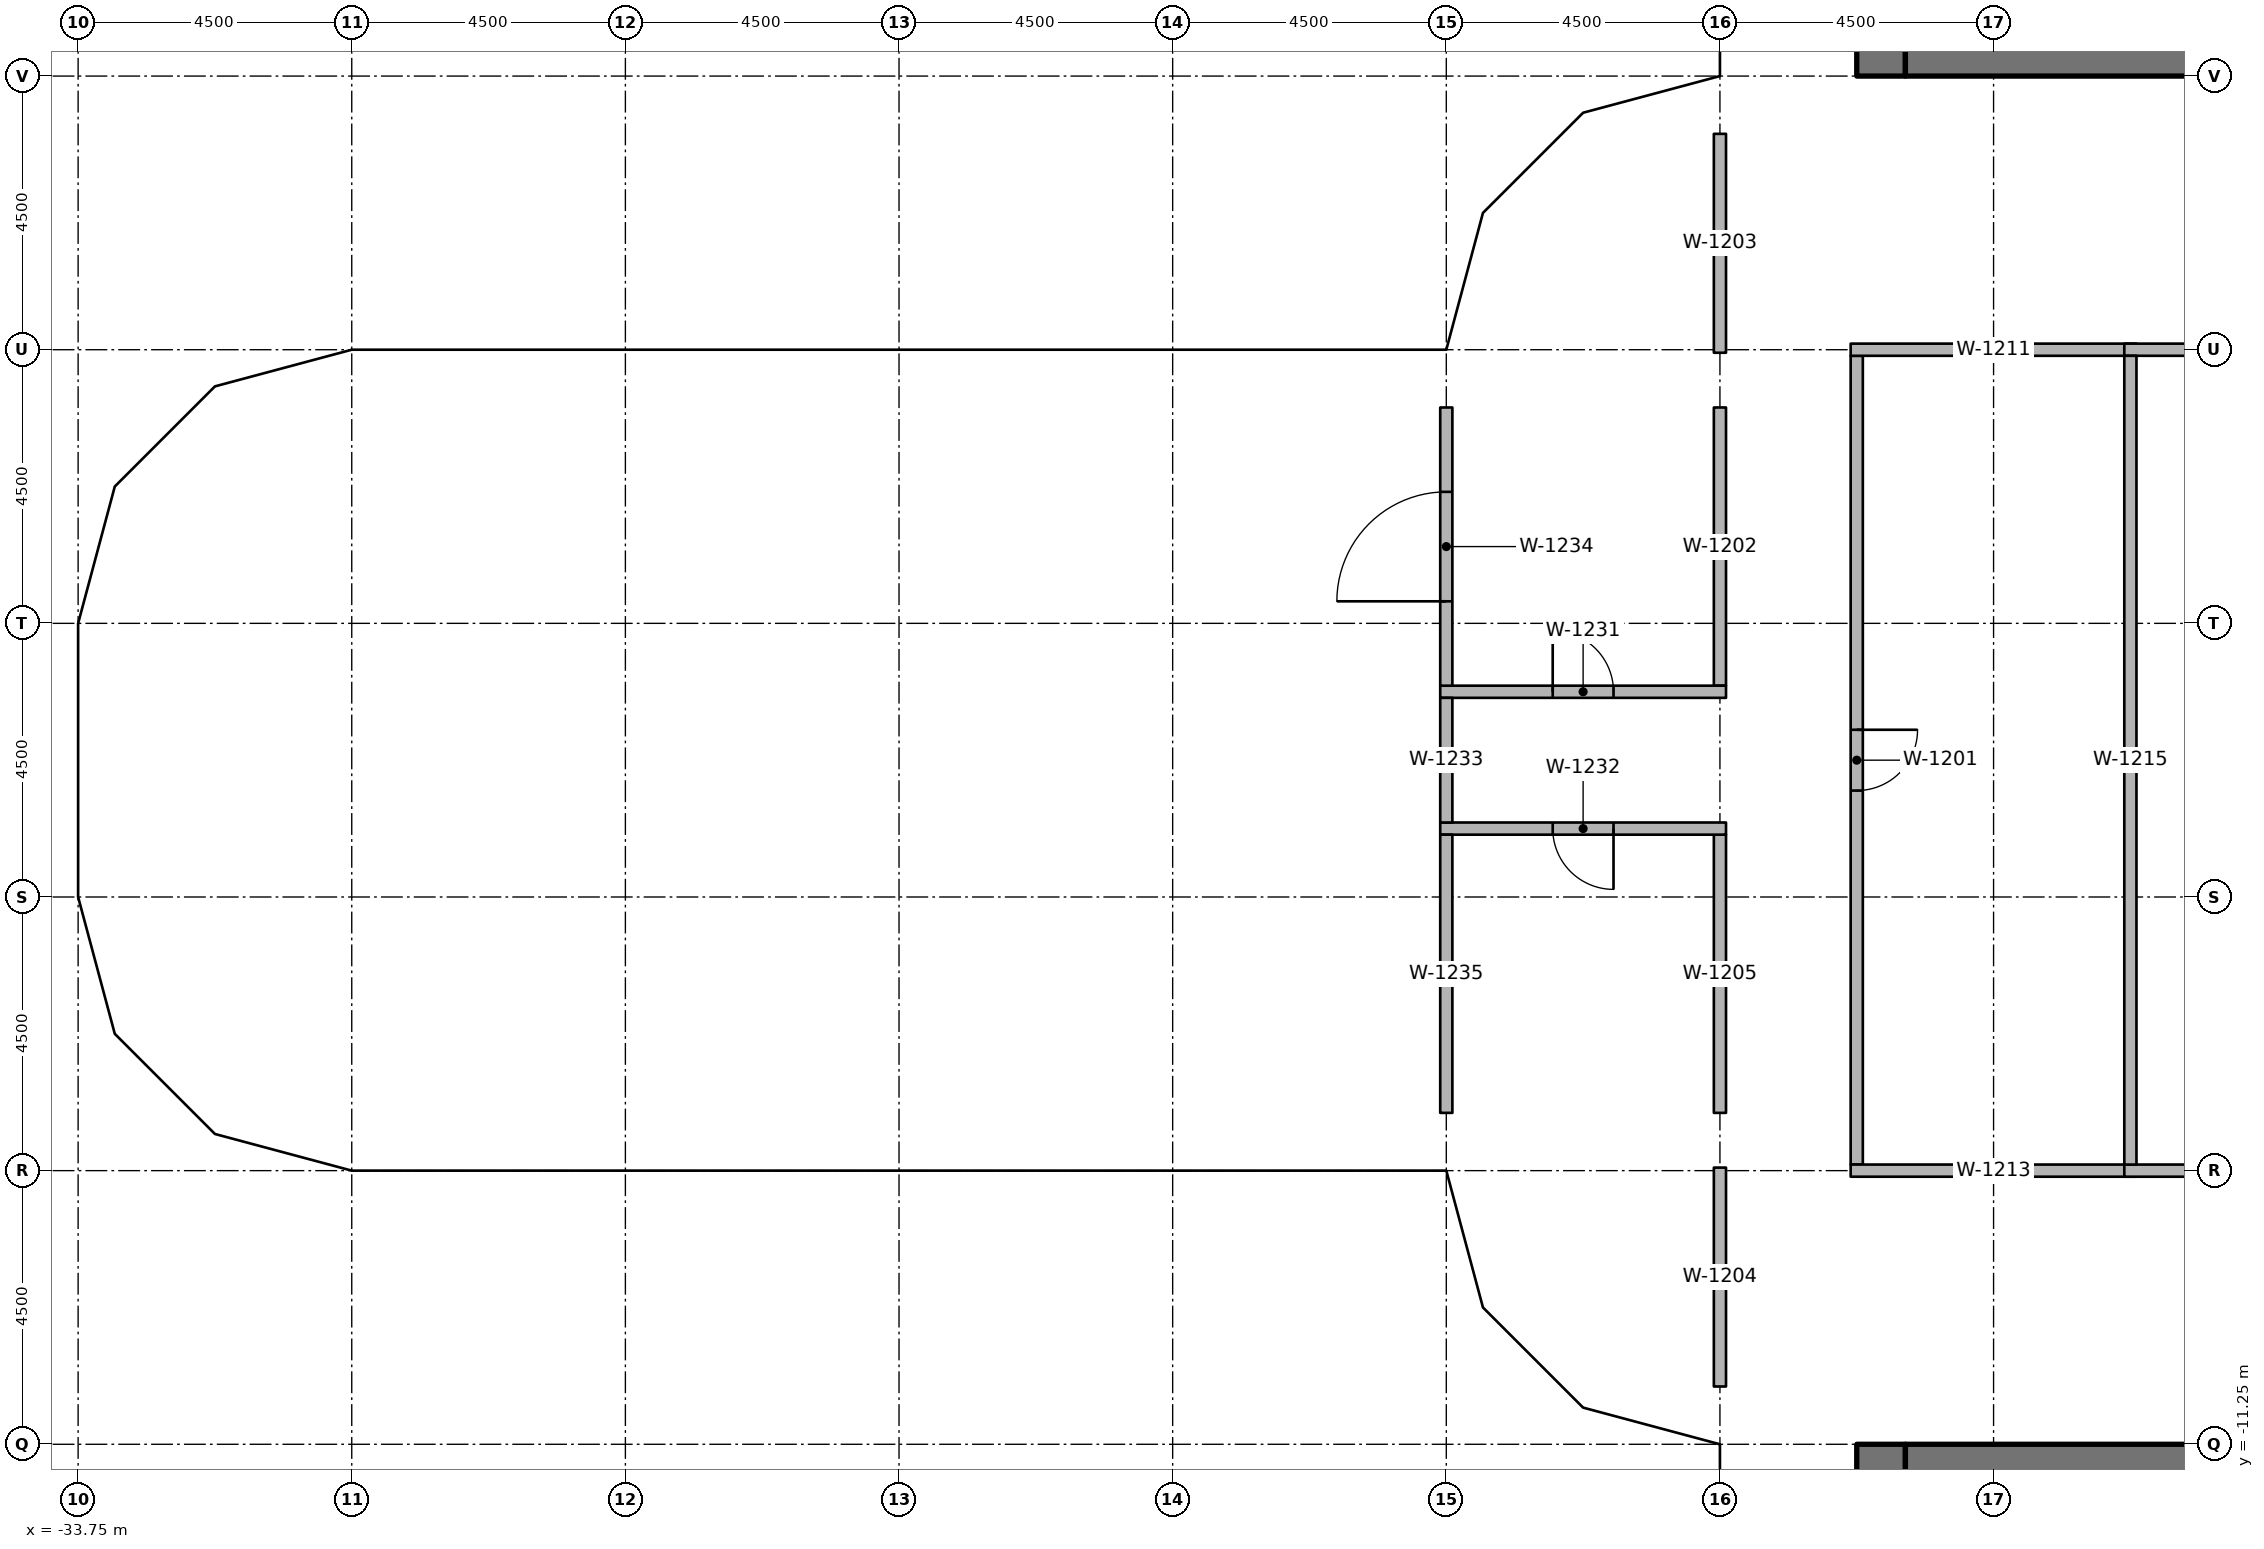
"""IFC4 building model, lengths in metres.
Left out: names, types, materials, properties, quantities, classifications, styles, units other than length and angle.
Written with IfcOpenShell. Run it as: python <this file> out.ifc"""

import sys

from ifc_helpers import new_model, si_unit, direction, frame, frame_2d, origin, origin_2d, place, context, subcontext, project, spatial, rectangle, extrude, element, fill, save


model = new_model("IFC4")
c1 = context("Model", 3, precision=1e-05, world=origin(), true_north=direction((0.0, 1.0)))
c2 = subcontext(c1, "Body", "Model", "MODEL_VIEW")
j1 = project(units=[si_unit("LENGTHUNIT", "METRE"), si_unit("PLANEANGLEUNIT", "RADIAN")], contexts=[c1])
p1 = place(None, origin())
s1 = spatial("IfcSite", under=j1, at=p1, CompositionType="ELEMENT")
p2 = place(p1, origin())
s2 = spatial("IfcBuilding", under=s1, at=p2, CompositionType="ELEMENT")
p3 = place(p2, frame((0.0, 0.0, 128.4)))
s3 = spatial("IfcBuildingStorey", under=s2, at=p3, CompositionType="ELEMENT", Elevation=128.4)
for number, where, z_axis, x_axis in (
    (1, (-33.11, -2.25, 0.0), (0.0, 0.0, 1.0), (1.0, 0.0, 0.0)),
    (2, (-33.11, 2.25, 0.0), (0.0, 0.0, 1.0), (1.0, 0.0, 0.0)),
    (3, (-28.908, -5.475, 0.0), (0.0, 0.0, 1.0), (1.0, 0.0, 0.0)),
    (4, (-28.908, 5.475, 0.0), (0.0, 0.0, 1.0), (1.0, 0.0, 0.0)),
    (5, (-24.75, -6.25, 0.0), (0.0, 0.0, 1.0), (1.0, 0.0, 0.0)),
    (6, (-24.75, 6.25, 0.0), (0.0, 0.0, 1.0), (1.0, 0.0, 0.0)),
    (7, (-20.25, -6.11, 0.0), (0.0, 0.0, 1.0), (1.0, 0.0, 0.0)),
    (8, (-20.25, 6.11, 0.0), (0.0, 0.0, 1.0), (1.0, 0.0, 0.0)),
    (9, (-15.75, -6.25, 0.0), (0.0, 0.0, 1.0), (1.0, 0.0, 0.0)),
    (10, (-15.75, 6.25, 0.0), (0.0, 0.0, 1.0), (1.0, 0.0, 0.0)),
    (11, (-10.75, -6.25, 0.0), (0.0, 0.0, 1.0), (1.0, 0.0, 0.0)),
    (12, (-10.75, 6.25, 0.0), (0.0, 0.0, 1.0), (1.0, 0.0, 0.0)),
    (13, (-6.25, -10.75, 0.0), (0.0, 0.0, 1.0), (1.0, 0.0, 0.0)),
    (14, (-6.25, -6.25, 0.0), (0.0, 0.0, 1.0), (1.0, 0.0, 0.0)),
    (15, (-6.25, 6.25, 0.0), (0.0, 0.0, 1.0), (1.0, 0.0, 0.0)),
    (16, (-6.25, 10.75, 0.0), (0.0, 0.0, 1.0), (1.0, 0.0, 0.0)),
):
    element("IfcColumn", number, at=place(p3, frame(where, z_axis=z_axis, x_axis=x_axis)), inside=s3, PredefinedType="COLUMN", context=c2, shape_type="SweptSolid", body=[
        extrude(rectangle(XDim=0.9, YDim=0.9, at=origin_2d()), origin(), (0.0, 0.0, 1.0), 3.65),
    ])
p4 = place(p3, frame((-4.1, 11.25, 0.0), z_axis=(0.0, 0.0, 1.0), x_axis=(0.0, 1.0, 0.0)))
e17 = element("IfcWall", 17, at=p4, inside=s3, PredefinedType="SHEAR", context=c2, shape_type="SweptSolid", body=[
    extrude(rectangle(XDim=15.0, YDim=0.8, at=frame_2d((7.5, 0.0))), origin(), (0.0, 0.0, 1.0), 3.8),
])
p5 = place(p4, frame((7.15, 0.0, 0.0)))
e18 = element("IfcOpeningElement", 18, at=p5, cuts=e17, PredefinedType="OPENING", context=c2, shape_type="SweptSolid", body=[
    extrude(rectangle(XDim=1.5, YDim=2.3, at=frame_2d((0.75, 1.15))), frame((0.0, 0.41, 0.0), z_axis=(0.0, -1.0, 0.0), x_axis=(1.0, 0.0, 0.0)), (0.0, 0.0, 1.0), 0.82),
])
p6 = place(p4, frame((13.9, 0.0, 0.0)))
e19 = element("IfcOpeningElement", 19, at=p6, cuts=e17, PredefinedType="OPENING", context=c2, shape_type="SweptSolid", body=[
    extrude(rectangle(XDim=0.9, YDim=2.1, at=frame_2d((0.45, 1.05))), frame((0.0, 0.41, 0.0), z_axis=(0.0, -1.0, 0.0), x_axis=(1.0, 0.0, 0.0)), (0.0, 0.0, 1.0), 0.82),
])
p7 = place(p4, frame((1.15, 0.0, 0.0)))
e20 = element("IfcOpeningElement", 20, at=p7, cuts=e17, PredefinedType="OPENING", context=c2, shape_type="SweptSolid", body=[
    extrude(rectangle(XDim=1.2, YDim=2.1, at=frame_2d((0.6, 1.05))), frame((0.0, 0.41, 0.0), z_axis=(0.0, -1.0, 0.0), x_axis=(1.0, 0.0, 0.0)), (0.0, 0.0, 1.0), 0.82),
])
p8 = place(p3, frame((-3.7, 11.65, 0.0), z_axis=(0.0, 0.0, 1.0), x_axis=(1.0, 0.0, 0.0)))
e21 = element("IfcWall", 21, at=p8, inside=s3, PredefinedType="SHEAR", context=c2, shape_type="SweptSolid", body=[
    extrude(rectangle(XDim=7.4, YDim=0.8, at=frame_2d((3.7, 0.0))), origin(), (0.0, 0.0, 1.0), 3.8),
])
p9 = place(p3, frame((-4.1, -11.25, 0.0), z_axis=(0.0, 0.0, 1.0), x_axis=(0.0, -1.0, 0.0)))
e22 = element("IfcWall", 22, at=p9, inside=s3, PredefinedType="SHEAR", context=c2, shape_type="SweptSolid", body=[
    extrude(rectangle(XDim=15.0, YDim=0.8, at=frame_2d((7.5, 0.0))), origin(), (0.0, 0.0, 1.0), 3.8),
])
p10 = place(p9, frame((7.15, 0.0, 0.0)))
e23 = element("IfcOpeningElement", 23, at=p10, cuts=e22, PredefinedType="OPENING", context=c2, shape_type="SweptSolid", body=[
    extrude(rectangle(XDim=1.5, YDim=2.3, at=frame_2d((0.75, 1.15))), frame((0.0, 0.41, 0.0), z_axis=(0.0, -1.0, 0.0), x_axis=(1.0, 0.0, 0.0)), (0.0, 0.0, 1.0), 0.82),
])
p11 = place(p9, frame((5.55, 0.0, 0.0)))
e24 = element("IfcOpeningElement", 24, at=p11, cuts=e22, PredefinedType="OPENING", context=c2, shape_type="SweptSolid", body=[
    extrude(rectangle(XDim=1.2, YDim=2.1, at=frame_2d((0.6, 1.05))), frame((0.0, 0.41, 0.0), z_axis=(0.0, -1.0, 0.0), x_axis=(1.0, 0.0, 0.0)), (0.0, 0.0, 1.0), 0.82),
])
p12 = place(p3, frame((-3.7, -11.65, 0.0), z_axis=(0.0, 0.0, 1.0), x_axis=(1.0, 0.0, 0.0)))
e25 = element("IfcWall", 25, at=p12, inside=s3, PredefinedType="SHEAR", context=c2, shape_type="SweptSolid", body=[
    extrude(rectangle(XDim=7.4, YDim=0.8, at=frame_2d((3.7, 0.0))), origin(), (0.0, 0.0, 1.0), 3.8),
])
p13 = place(p3, frame((-4.5, 6.65, 0.0), z_axis=(0.0, 0.0, 1.0), x_axis=(0.0, -1.0, 0.0)))
e26 = element("IfcWall", 26, at=p13, inside=s3, PredefinedType="PARTITIONING", context=c2, shape_type="SweptSolid", body=[
    extrude(rectangle(XDim=13.3, YDim=0.2, at=frame_2d((6.65, 0.0))), origin(), (0.0, 0.0, 1.0), 2.738),
])
p14 = place(p13, frame((6.15, 0.0, 0.0)))
e27 = element("IfcOpeningElement", 27, at=p14, cuts=e26, PredefinedType="OPENING", context=c2, shape_type="SweptSolid", body=[
    extrude(rectangle(XDim=1.0, YDim=2.1, at=frame_2d((0.5, 1.05))), frame((0.0, 0.11, 0.0), z_axis=(0.0, -1.0, 0.0), x_axis=(1.0, 0.0, 0.0)), (0.0, 0.0, 1.0), 0.22),
])
p15 = place(p3, frame((-6.75, 1.225, 0.0), z_axis=(0.0, 0.0, 1.0), x_axis=(0.0, 1.0, 0.0)))
e28 = element("IfcWall", 28, at=p15, inside=s3, PredefinedType="PARTITIONING", context=c2, shape_type="SweptSolid", body=[
    extrude(rectangle(XDim=4.575, YDim=0.2, at=frame_2d((2.288, 0.0))), origin(), (0.0, 0.0, 1.0), 2.738),
])
for number, where, z_axis, x_axis in (
    (29, (-6.75, 6.7, 0.0), (0.0, 0.0, 1.0), (0.0, 1.0, 0.0)),
    (30, (-6.75, -10.3, 0.0), (0.0, 0.0, 1.0), (0.0, 1.0, 0.0)),
):
    element("IfcWall", number, at=place(p3, frame(where, z_axis=z_axis, x_axis=x_axis)), inside=s3, PredefinedType="PARTITIONING", context=c2, shape_type="SweptSolid", body=[
        extrude(rectangle(XDim=3.6, YDim=0.2, at=frame_2d((1.8, 0.0))), origin(), (0.0, 0.0, 1.0), 2.738),
    ])
p16 = place(p3, frame((-6.75, -5.8, 0.0), z_axis=(0.0, 0.0, 1.0), x_axis=(0.0, 1.0, 0.0)))
e31 = element("IfcWall", 31, at=p16, inside=s3, PredefinedType="PARTITIONING", context=c2, shape_type="SweptSolid", body=[
    extrude(rectangle(XDim=4.575, YDim=0.2, at=frame_2d((2.288, 0.0))), origin(), (0.0, 0.0, 1.0), 2.738),
])
for number, where, z_axis, x_axis in (
    (32, (-4.6, 6.75, 0.0), (0.0, 0.0, 1.0), (1.0, 0.0, 0.0)),
    (33, (-0.1, 6.75, 0.0), (0.0, 0.0, 1.0), (1.0, 0.0, 0.0)),
    (34, (-4.6, -6.75, 0.0), (0.0, 0.0, 1.0), (1.0, 0.0, 0.0)),
    (35, (-0.1, -6.75, 0.0), (0.0, 0.0, 1.0), (1.0, 0.0, 0.0)),
):
    element("IfcWall", number, at=place(p3, frame(where, z_axis=z_axis, x_axis=x_axis)), inside=s3, PredefinedType="PARTITIONING", context=c2, shape_type="SweptSolid", body=[
        extrude(rectangle(XDim=4.7, YDim=0.2, at=frame_2d((2.35, 0.0))), origin(), (0.0, 0.0, 1.0), 2.738),
    ])
p17 = place(p3, frame((0.0, -6.65, 0.0), z_axis=(0.0, 0.0, 1.0), x_axis=(0.0, 1.0, 0.0)))
e36 = element("IfcWall", 36, at=p17, inside=s3, PredefinedType="PARTITIONING", context=c2, shape_type="SweptSolid", body=[
    extrude(rectangle(XDim=13.3, YDim=0.2, at=frame_2d((6.65, 0.0))), origin(), (0.0, 0.0, 1.0), 2.738),
])
p18 = place(p3, frame((-11.35, 1.125, 0.0), z_axis=(0.0, 0.0, 1.0), x_axis=(1.0, 0.0, 0.0)))
e37 = element("IfcWall", 37, at=p18, inside=s3, PredefinedType="PARTITIONING", context=c2, shape_type="SweptSolid", body=[
    extrude(rectangle(XDim=4.7, YDim=0.2, at=frame_2d((2.35, 0.0))), origin(), (0.0, 0.0, 1.0), 2.738),
])
p19 = place(p18, frame((1.85, 0.0, 0.0)))
e38 = element("IfcOpeningElement", 38, at=p19, cuts=e37, PredefinedType="OPENING", context=c2, shape_type="SweptSolid", body=[
    extrude(rectangle(XDim=1.0, YDim=2.1, at=frame_2d((0.5, 1.05))), frame((0.0, 0.11, 0.0), z_axis=(0.0, -1.0, 0.0), x_axis=(1.0, 0.0, 0.0)), (0.0, 0.0, 1.0), 0.22),
])
p20 = place(p3, frame((-6.65, -1.125, 0.0), z_axis=(0.0, 0.0, 1.0), x_axis=(-1.0, 0.0, 0.0)))
e39 = element("IfcWall", 39, at=p20, inside=s3, PredefinedType="PARTITIONING", context=c2, shape_type="SweptSolid", body=[
    extrude(rectangle(XDim=4.7, YDim=0.2, at=frame_2d((2.35, 0.0))), origin(), (0.0, 0.0, 1.0), 2.738),
])
p21 = place(p20, frame((1.85, 0.0, 0.0)))
e40 = element("IfcOpeningElement", 40, at=p21, cuts=e39, PredefinedType="OPENING", context=c2, shape_type="SweptSolid", body=[
    extrude(rectangle(XDim=1.0, YDim=2.1, at=frame_2d((0.5, 1.05))), frame((0.0, 0.11, 0.0), z_axis=(0.0, -1.0, 0.0), x_axis=(1.0, 0.0, 0.0)), (0.0, 0.0, 1.0), 0.22),
])
p22 = place(p3, frame((-11.25, -1.025, 0.0), z_axis=(0.0, 0.0, 1.0), x_axis=(0.0, 1.0, 0.0)))
e41 = element("IfcWall", 41, at=p22, inside=s3, PredefinedType="PARTITIONING", context=c2, shape_type="SweptSolid", body=[
    extrude(rectangle(XDim=2.05, YDim=0.2, at=frame_2d((1.025, 0.0))), origin(), (0.0, 0.0, 1.0), 2.738),
])
p23 = place(p3, frame((-11.25, 1.225, 0.0), z_axis=(0.0, 0.0, 1.0), x_axis=(0.0, 1.0, 0.0)))
e42 = element("IfcWall", 42, at=p23, inside=s3, PredefinedType="PARTITIONING", context=c2, shape_type="SweptSolid", body=[
    extrude(rectangle(XDim=4.575, YDim=0.2, at=frame_2d((2.288, 0.0))), origin(), (0.0, 0.0, 1.0), 2.738),
])
p24 = place(p23, frame((1.387, 0.0, 0.0)))
e43 = element("IfcOpeningElement", 43, at=p24, cuts=e42, PredefinedType="OPENING", context=c2, shape_type="SweptSolid", body=[
    extrude(rectangle(XDim=1.8, YDim=2.1, at=frame_2d((0.9, 1.05))), frame((0.0, 0.11, 0.0), z_axis=(0.0, -1.0, 0.0), x_axis=(1.0, 0.0, 0.0)), (0.0, 0.0, 1.0), 0.22),
])
p25 = place(p3, frame((-11.25, -5.8, 0.0), z_axis=(0.0, 0.0, 1.0), x_axis=(0.0, 1.0, 0.0)))
e44 = element("IfcWall", 44, at=p25, inside=s3, PredefinedType="PARTITIONING", context=c2, shape_type="SweptSolid", body=[
    extrude(rectangle(XDim=4.575, YDim=0.2, at=frame_2d((2.288, 0.0))), origin(), (0.0, 0.0, 1.0), 2.738),
])
p26 = place(p14, origin())
e45 = element("IfcDoor", 45, at=p26, inside=s3, OperationType="SINGLE_SWING_RIGHT", PredefinedType="DOOR", context=c2, shape_type="SweptSolid", body=[
    extrude(rectangle(XDim=1.0, YDim=2.1, at=frame_2d((0.5, 1.05))), frame((0.0, 0.025, 0.0), z_axis=(0.0, -1.0, 0.0), x_axis=(1.0, 0.0, 0.0)), (0.0, 0.0, 1.0), 0.05),
])
fill(e27, e45)
p27 = place(p24, origin())
e46 = element("IfcDoor", 46, at=p27, inside=s3, OperationType="DOUBLE_DOOR_SINGLE_SWING", PredefinedType="DOOR", context=c2, shape_type="SweptSolid", body=[
    extrude(rectangle(XDim=1.8, YDim=2.1, at=frame_2d((0.9, 1.05))), frame((0.0, 0.025, 0.0), z_axis=(0.0, -1.0, 0.0), x_axis=(1.0, 0.0, 0.0)), (0.0, 0.0, 1.0), 0.05),
])
fill(e43, e46)
p28 = place(p19, origin())
e47 = element("IfcDoor", 47, at=p28, inside=s3, OperationType="SINGLE_SWING_RIGHT", PredefinedType="DOOR", context=c2, shape_type="SweptSolid", body=[
    extrude(rectangle(XDim=1.0, YDim=2.1, at=frame_2d((0.5, 1.05))), frame((0.0, 0.025, 0.0), z_axis=(0.0, -1.0, 0.0), x_axis=(1.0, 0.0, 0.0)), (0.0, 0.0, 1.0), 0.05),
])
fill(e38, e47)
p29 = place(p21, origin())
e48 = element("IfcDoor", 48, at=p29, inside=s3, OperationType="SINGLE_SWING_RIGHT", PredefinedType="DOOR", context=c2, shape_type="SweptSolid", body=[
    extrude(rectangle(XDim=1.0, YDim=2.1, at=frame_2d((0.5, 1.05))), frame((0.0, 0.025, 0.0), z_axis=(0.0, -1.0, 0.0), x_axis=(1.0, 0.0, 0.0)), (0.0, 0.0, 1.0), 0.05),
])
fill(e40, e48)
save(model, sys.argv[1])
